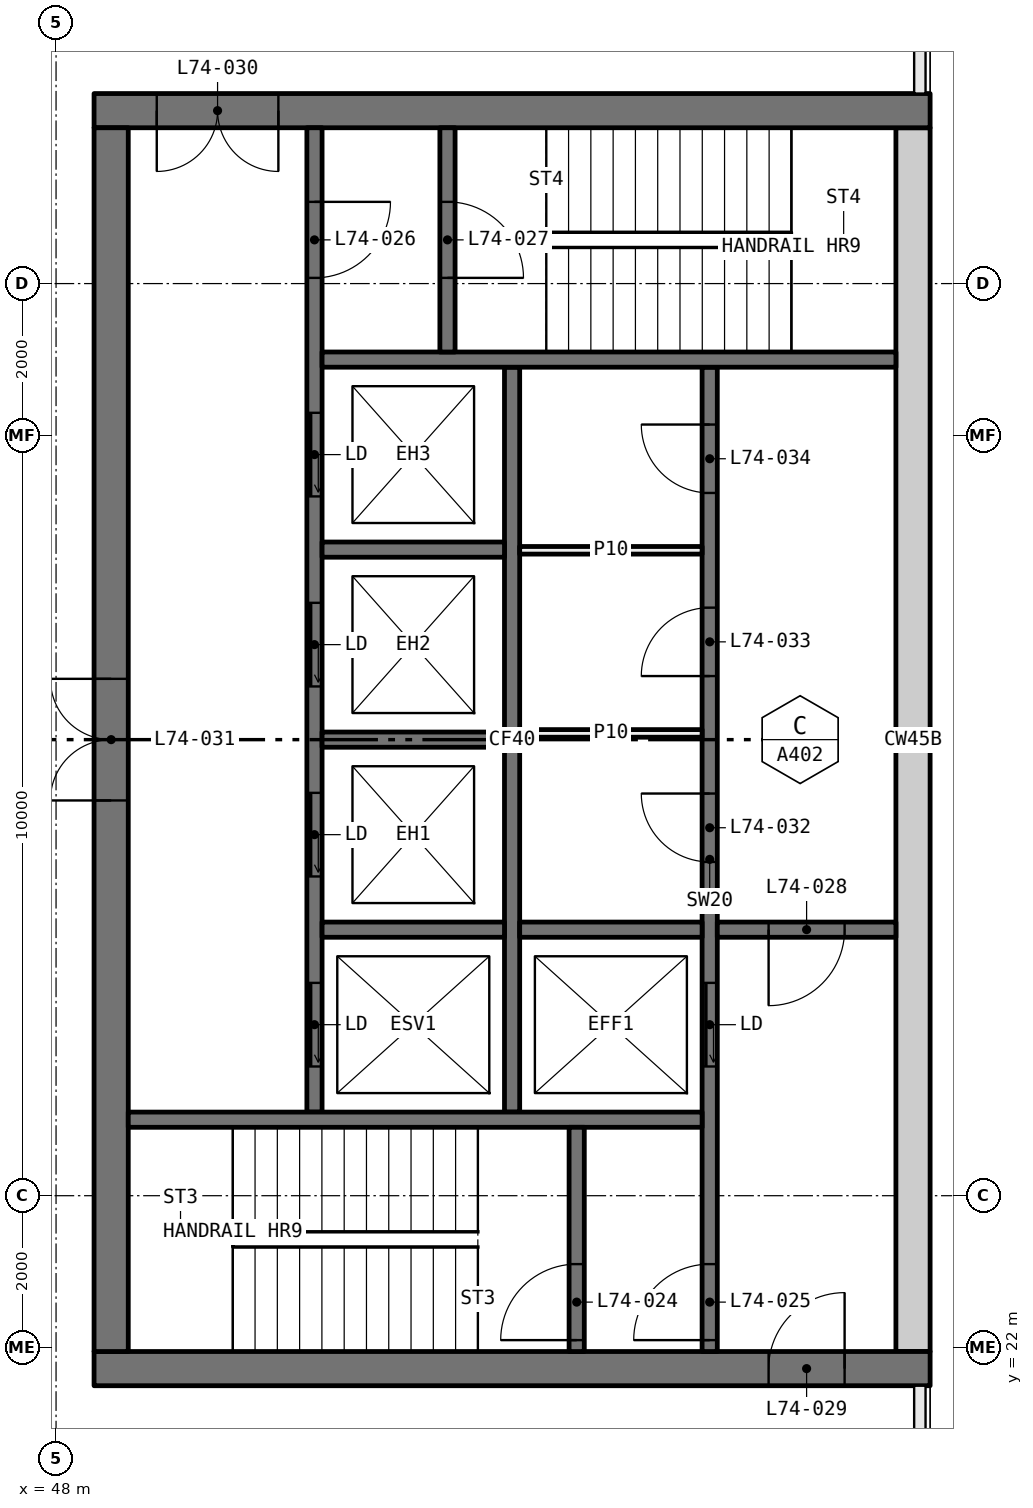
"""IFC4 building model, lengths in metres.
Left out: names, types, materials, properties, quantities, classifications, styles, units other than length and angle.
Written with IfcOpenShell. Run it as: python <this file> out.ifc"""

import sys

from ifc_helpers import new_model, si_unit, direction, frame, frame_2d, origin, place, context, subcontext, project, spatial, rectangle, extrude, element, fill, save


model = new_model("IFC4")
c1 = context("Model", 3, precision=1e-05, world=origin(), true_north=direction((0.0, 1.0)))
c2 = subcontext(c1, "Body", "Model", "MODEL_VIEW")
j1 = project(units=[si_unit("LENGTHUNIT", "METRE"), si_unit("PLANEANGLEUNIT", "RADIAN")], contexts=[c1])
p1 = place(None, origin())
s1 = spatial("IfcSite", under=j1, at=p1, CompositionType="ELEMENT")
p2 = place(p1, origin())
s2 = spatial("IfcBuilding", under=s1, at=p2, CompositionType="ELEMENT")
p3 = place(p2, frame((0.0, 0.0, 273.15)))
s3 = spatial("IfcBuildingStorey", under=s2, at=p3, CompositionType="ELEMENT", Elevation=273.15)
p4 = place(p3, frame((59.5, 21.725, 0.0), z_axis=(0.0, 0.0, 1.0), x_axis=(-1.0, 0.0, 0.0)))
e1 = element("IfcWall", 1, at=p4, inside=s3, PredefinedType="SHEAR", context=c2, shape_type="SweptSolid", body=[
    extrude(rectangle(XDim=11.0, YDim=0.45, at=frame_2d((5.5, 0.0))), origin(), (0.0, 0.0, 1.0), 4.4),
])
p5 = place(p4, frame((1.125, 0.0, 0.0)))
e2 = element("IfcOpeningElement", 2, at=p5, cuts=e1, PredefinedType="OPENING", context=c2, shape_type="SweptSolid", body=[
    extrude(rectangle(XDim=1.0, YDim=2.1, at=frame_2d((0.5, 1.05))), frame((0.0, 0.235, 0.0), z_axis=(0.0, -1.0, 0.0), x_axis=(1.0, 0.0, 0.0)), (0.0, 0.0, 1.0), 0.47),
])
p6 = place(p3, frame((59.5, 38.275, 0.0), z_axis=(0.0, 0.0, 1.0), x_axis=(-1.0, 0.0, 0.0)))
e3 = element("IfcWall", 3, at=p6, inside=s3, PredefinedType="SHEAR", context=c2, shape_type="SweptSolid", body=[
    extrude(rectangle(XDim=11.0, YDim=0.45, at=frame_2d((5.5, 0.0))), origin(), (0.0, 0.0, 1.0), 4.4),
])
p7 = place(p6, frame((8.575, 0.0, 0.0)))
e4 = element("IfcOpeningElement", 4, at=p7, cuts=e3, PredefinedType="OPENING", context=c2, shape_type="SweptSolid", body=[
    extrude(rectangle(XDim=1.6, YDim=2.1, at=frame_2d((0.8, 1.05))), frame((0.0, 0.235, 0.0), z_axis=(0.0, -1.0, 0.0), x_axis=(1.0, 0.0, 0.0)), (0.0, 0.0, 1.0), 0.47),
])
p8 = place(p3, frame((59.275, 21.95, 0.0), z_axis=(0.0, 0.0, 1.0), x_axis=(0.0, 1.0, 0.0)))
e5 = element("IfcWall", 5, at=p8, inside=s3, PredefinedType="SHEAR", context=c2, shape_type="SweptSolid", body=[
    extrude(rectangle(XDim=16.1, YDim=0.45, at=frame_2d((8.05, 0.0))), origin(), (0.0, 0.0, 1.0), 4.4),
])
p9 = place(p3, frame((48.725, 21.95, 0.0), z_axis=(0.0, 0.0, 1.0), x_axis=(0.0, 1.0, 0.0)))
e6 = element("IfcWall", 6, at=p9, inside=s3, PredefinedType="SHEAR", context=c2, shape_type="SweptSolid", body=[
    extrude(rectangle(XDim=16.1, YDim=0.45, at=frame_2d((8.05, 0.0))), origin(), (0.0, 0.0, 1.0), 4.4),
])
p10 = place(p9, frame((7.25, 0.0, 0.0)))
e7 = element("IfcOpeningElement", 7, at=p10, cuts=e6, PredefinedType="OPENING", context=c2, shape_type="SweptSolid", body=[
    extrude(rectangle(XDim=1.6, YDim=2.1, at=frame_2d((0.8, 1.05))), frame((0.0, 0.235, 0.0), z_axis=(0.0, -1.0, 0.0), x_axis=(1.0, 0.0, 0.0)), (0.0, 0.0, 1.0), 0.47),
])
p11 = place(p3, frame((56.6, 21.95, 0.0), z_axis=(0.0, 0.0, 1.0), x_axis=(0.0, 1.0, 0.0)))
e8 = element("IfcWall", 8, at=p11, inside=s3, PredefinedType="SOLIDWALL", context=c2, shape_type="SweptSolid", body=[
    extrude(rectangle(XDim=12.95, YDim=0.2, at=frame_2d((6.475, 0.0))), origin(), (0.0, 0.0, 1.0), 4.4),
])
p12 = place(p11, frame((3.75, 0.0, 0.0)))
e9 = element("IfcOpeningElement", 9, at=p12, cuts=e8, PredefinedType="OPENING", context=c2, shape_type="SweptSolid", body=[
    extrude(rectangle(XDim=1.1, YDim=2.1, at=frame_2d((0.55, 1.05))), frame((0.0, 0.11, 0.0), z_axis=(0.0, -1.0, 0.0), x_axis=(1.0, 0.0, 0.0)), (0.0, 0.0, 1.0), 0.22),
])
p13 = place(p11, frame((0.15, 0.0, 0.0)))
e10 = element("IfcOpeningElement", 10, at=p13, cuts=e8, PredefinedType="OPENING", context=c2, shape_type="SweptSolid", body=[
    extrude(rectangle(XDim=1.0, YDim=2.1, at=frame_2d((0.5, 1.05))), frame((0.0, 0.11, 0.0), z_axis=(0.0, -1.0, 0.0), x_axis=(1.0, 0.0, 0.0)), (0.0, 0.0, 1.0), 0.22),
])
p14 = place(p11, frame((6.441, 0.0, 0.0)))
e11 = element("IfcOpeningElement", 11, at=p14, cuts=e8, PredefinedType="OPENING", context=c2, shape_type="SweptSolid", body=[
    extrude(rectangle(XDim=0.9, YDim=2.1, at=frame_2d((0.45, 1.05))), frame((0.0, 0.11, 0.0), z_axis=(0.0, -1.0, 0.0), x_axis=(1.0, 0.0, 0.0)), (0.0, 0.0, 1.0), 0.22),
])
p15 = place(p11, frame((8.886, 0.0, 0.0)))
e12 = element("IfcOpeningElement", 12, at=p15, cuts=e8, PredefinedType="OPENING", context=c2, shape_type="SweptSolid", body=[
    extrude(rectangle(XDim=0.9, YDim=2.1, at=frame_2d((0.45, 1.05))), frame((0.0, 0.11, 0.0), z_axis=(0.0, -1.0, 0.0), x_axis=(1.0, 0.0, 0.0)), (0.0, 0.0, 1.0), 0.22),
])
p16 = place(p11, frame((11.295, 0.0, 0.0)))
e13 = element("IfcOpeningElement", 13, at=p16, cuts=e8, PredefinedType="OPENING", context=c2, shape_type="SweptSolid", body=[
    extrude(rectangle(XDim=0.9, YDim=2.1, at=frame_2d((0.45, 1.05))), frame((0.0, 0.11, 0.0), z_axis=(0.0, -1.0, 0.0), x_axis=(1.0, 0.0, 0.0)), (0.0, 0.0, 1.0), 0.22),
])
p17 = place(p3, frame((51.4, 25.1, 0.0), z_axis=(0.0, 0.0, 1.0), x_axis=(0.0, 1.0, 0.0)))
e14 = element("IfcWall", 14, at=p17, inside=s3, PredefinedType="SOLIDWALL", context=c2, shape_type="SweptSolid", body=[
    extrude(rectangle(XDim=12.95, YDim=0.2, at=frame_2d((6.475, 0.0))), origin(), (0.0, 0.0, 1.0), 4.4),
])
p18 = place(p17, frame((0.6, 0.0, 0.0)))
e15 = element("IfcOpeningElement", 15, at=p18, cuts=e14, PredefinedType="OPENING", context=c2, shape_type="SweptSolid", body=[
    extrude(rectangle(XDim=1.1, YDim=2.1, at=frame_2d((0.55, 1.05))), frame((0.0, 0.11, 0.0), z_axis=(0.0, -1.0, 0.0), x_axis=(1.0, 0.0, 0.0)), (0.0, 0.0, 1.0), 0.22),
])
p19 = place(p17, frame((3.1, 0.0, 0.0)))
e16 = element("IfcOpeningElement", 16, at=p19, cuts=e14, PredefinedType="OPENING", context=c2, shape_type="SweptSolid", body=[
    extrude(rectangle(XDim=1.1, YDim=2.1, at=frame_2d((0.55, 1.05))), frame((0.0, 0.11, 0.0), z_axis=(0.0, -1.0, 0.0), x_axis=(1.0, 0.0, 0.0)), (0.0, 0.0, 1.0), 0.22),
])
p20 = place(p17, frame((5.6, 0.0, 0.0)))
e17 = element("IfcOpeningElement", 17, at=p20, cuts=e14, PredefinedType="OPENING", context=c2, shape_type="SweptSolid", body=[
    extrude(rectangle(XDim=1.1, YDim=2.1, at=frame_2d((0.55, 1.05))), frame((0.0, 0.11, 0.0), z_axis=(0.0, -1.0, 0.0), x_axis=(1.0, 0.0, 0.0)), (0.0, 0.0, 1.0), 0.22),
])
p21 = place(p17, frame((8.1, 0.0, 0.0)))
e18 = element("IfcOpeningElement", 18, at=p21, cuts=e14, PredefinedType="OPENING", context=c2, shape_type="SweptSolid", body=[
    extrude(rectangle(XDim=1.1, YDim=2.1, at=frame_2d((0.55, 1.05))), frame((0.0, 0.11, 0.0), z_axis=(0.0, -1.0, 0.0), x_axis=(1.0, 0.0, 0.0)), (0.0, 0.0, 1.0), 0.22),
])
p22 = place(p17, frame((10.975, 0.0, 0.0)))
e19 = element("IfcOpeningElement", 19, at=p22, cuts=e14, PredefinedType="OPENING", context=c2, shape_type="SweptSolid", body=[
    extrude(rectangle(XDim=1.0, YDim=2.1, at=frame_2d((0.5, 1.05))), frame((0.0, 0.11, 0.0), z_axis=(0.0, -1.0, 0.0), x_axis=(1.0, 0.0, 0.0)), (0.0, 0.0, 1.0), 0.22),
])
p23 = place(p3, frame((54.0, 25.1, 0.0), z_axis=(0.0, 0.0, 1.0), x_axis=(0.0, 1.0, 0.0)))
e20 = element("IfcWall", 20, at=p23, inside=s3, PredefinedType="SOLIDWALL", context=c2, shape_type="SweptSolid", body=[
    extrude(rectangle(XDim=9.8, YDim=0.2, at=frame_2d((4.9, 0.0))), origin(), (0.0, 0.0, 1.0), 4.4),
])
for number, where, z_axis, x_axis in (
    (21, (56.5, 25.0, 0.0), (0.0, 0.0, 1.0), (-1.0, 0.0, 0.0)),
    (22, (59.05, 35.0, 0.0), (0.0, 0.0, 1.0), (-1.0, 0.0, 0.0)),
):
    element("IfcWall", number, at=place(p3, frame(where, z_axis=z_axis, x_axis=x_axis)), inside=s3, PredefinedType="SOLIDWALL", context=c2, shape_type="SweptSolid", body=[
        extrude(rectangle(XDim=7.55, YDim=0.2, at=frame_2d((3.775, 0.0))), origin(), (0.0, 0.0, 1.0), 4.4),
    ])
p24 = place(p3, frame((59.05, 27.5, 0.0), z_axis=(0.0, 0.0, 1.0), x_axis=(-1.0, 0.0, 0.0)))
e23 = element("IfcWall", 23, at=p24, inside=s3, PredefinedType="SOLIDWALL", context=c2, shape_type="SweptSolid", body=[
    extrude(rectangle(XDim=2.35, YDim=0.2, at=frame_2d((1.175, 0.0))), origin(), (0.0, 0.0, 1.0), 4.4),
])
p25 = place(p24, frame((0.675, 0.0, 0.0)))
e24 = element("IfcOpeningElement", 24, at=p25, cuts=e23, PredefinedType="OPENING", context=c2, shape_type="SweptSolid", body=[
    extrude(rectangle(XDim=1.0, YDim=2.1, at=frame_2d((0.5, 1.05))), frame((0.0, 0.11, 0.0), z_axis=(0.0, -1.0, 0.0), x_axis=(1.0, 0.0, 0.0)), (0.0, 0.0, 1.0), 0.22),
])
p26 = place(p3, frame((54.85, 21.95, 0.0), z_axis=(0.0, 0.0, 1.0), x_axis=(0.0, 1.0, 0.0)))
e25 = element("IfcWall", 25, at=p26, inside=s3, PredefinedType="SOLIDWALL", context=c2, shape_type="SweptSolid", body=[
    extrude(rectangle(XDim=2.95, YDim=0.2, at=frame_2d((1.475, 0.0))), origin(), (0.0, 0.0, 1.0), 4.4),
])
p27 = place(p26, frame((0.15, 0.0, 0.0)))
e26 = element("IfcOpeningElement", 26, at=p27, cuts=e25, PredefinedType="OPENING", context=c2, shape_type="SweptSolid", body=[
    extrude(rectangle(XDim=1.0, YDim=2.1, at=frame_2d((0.5, 1.05))), frame((0.0, 0.11, 0.0), z_axis=(0.0, -1.0, 0.0), x_axis=(1.0, 0.0, 0.0)), (0.0, 0.0, 1.0), 0.22),
])
p28 = place(p3, frame((53.15, 35.1, 0.0), z_axis=(0.0, 0.0, 1.0), x_axis=(0.0, 1.0, 0.0)))
e27 = element("IfcWall", 27, at=p28, inside=s3, PredefinedType="SOLIDWALL", context=c2, shape_type="SweptSolid", body=[
    extrude(rectangle(XDim=2.95, YDim=0.2, at=frame_2d((1.475, 0.0))), origin(), (0.0, 0.0, 1.0), 4.4),
])
p29 = place(p28, frame((0.975, 0.0, 0.0)))
e28 = element("IfcOpeningElement", 28, at=p29, cuts=e27, PredefinedType="OPENING", context=c2, shape_type="SweptSolid", body=[
    extrude(rectangle(XDim=1.0, YDim=2.1, at=frame_2d((0.5, 1.05))), frame((0.0, 0.11, 0.0), z_axis=(0.0, -1.0, 0.0), x_axis=(1.0, 0.0, 0.0)), (0.0, 0.0, 1.0), 0.22),
])
for number, where, z_axis, x_axis in (
    (29, (56.5, 27.5, 0.0), (0.0, 0.0, 1.0), (-1.0, 0.0, 0.0)),
    (30, (53.9, 27.5, 0.0), (0.0, 0.0, 1.0), (-1.0, 0.0, 0.0)),
    (31, (53.9, 30.0, 0.0), (0.0, 0.0, 1.0), (-1.0, 0.0, 0.0)),
    (32, (53.9, 32.5, 0.0), (0.0, 0.0, 1.0), (-1.0, 0.0, 0.0)),
):
    element("IfcWall", number, at=place(p3, frame(where, z_axis=z_axis, x_axis=x_axis)), inside=s3, PredefinedType="SOLIDWALL", context=c2, shape_type="SweptSolid", body=[
        extrude(rectangle(XDim=2.4, YDim=0.2, at=frame_2d((1.2, 0.0))), origin(), (0.0, 0.0, 1.0), 4.4),
    ])
for number, where, z_axis, x_axis in (
    (33, (56.5, 30.082, 0.0), (0.0, 0.0, 1.0), (-1.0, 0.0, 0.0)),
    (34, (56.5, 32.491, 0.0), (0.0, 0.0, 1.0), (-1.0, 0.0, 0.0)),
):
    element("IfcWall", number, at=place(p3, frame(where, z_axis=z_axis, x_axis=x_axis)), inside=s3, PredefinedType="PARTITIONING", context=c2, shape_type="SweptSolid", body=[
        extrude(rectangle(XDim=2.4, YDim=0.1, at=frame_2d((1.2, 0.0))), origin(), (0.0, 0.0, 1.0), 4.4),
    ])
p30 = place(p18, origin())
e35 = element("IfcDoor", 35, at=p30, inside=s3, OperationType="SLIDING_TO_LEFT", PredefinedType="DOOR", context=c2, shape_type="SweptSolid", body=[
    extrude(rectangle(XDim=1.1, YDim=2.1, at=frame_2d((0.55, 1.05))), frame((0.0, 0.025, 0.0), z_axis=(0.0, -1.0, 0.0), x_axis=(1.0, 0.0, 0.0)), (0.0, 0.0, 1.0), 0.05),
])
fill(e15, e35)
p31 = place(p19, origin())
e36 = element("IfcDoor", 36, at=p31, inside=s3, OperationType="SLIDING_TO_LEFT", PredefinedType="DOOR", context=c2, shape_type="SweptSolid", body=[
    extrude(rectangle(XDim=1.1, YDim=2.1, at=frame_2d((0.55, 1.05))), frame((0.0, 0.025, 0.0), z_axis=(0.0, -1.0, 0.0), x_axis=(1.0, 0.0, 0.0)), (0.0, 0.0, 1.0), 0.05),
])
fill(e16, e36)
p32 = place(p20, origin())
e37 = element("IfcDoor", 37, at=p32, inside=s3, OperationType="SLIDING_TO_LEFT", PredefinedType="DOOR", context=c2, shape_type="SweptSolid", body=[
    extrude(rectangle(XDim=1.1, YDim=2.1, at=frame_2d((0.55, 1.05))), frame((0.0, 0.025, 0.0), z_axis=(0.0, -1.0, 0.0), x_axis=(1.0, 0.0, 0.0)), (0.0, 0.0, 1.0), 0.05),
])
fill(e17, e37)
p33 = place(p21, origin())
e38 = element("IfcDoor", 38, at=p33, inside=s3, OperationType="SLIDING_TO_LEFT", PredefinedType="DOOR", context=c2, shape_type="SweptSolid", body=[
    extrude(rectangle(XDim=1.1, YDim=2.1, at=frame_2d((0.55, 1.05))), frame((0.0, 0.025, 0.0), z_axis=(0.0, -1.0, 0.0), x_axis=(1.0, 0.0, 0.0)), (0.0, 0.0, 1.0), 0.05),
])
fill(e18, e38)
p34 = place(p12, origin())
e39 = element("IfcDoor", 39, at=p34, inside=s3, OperationType="SLIDING_TO_LEFT", PredefinedType="DOOR", context=c2, shape_type="SweptSolid", body=[
    extrude(rectangle(XDim=1.1, YDim=2.1, at=frame_2d((0.55, 1.05))), frame((0.0, 0.025, 0.0), z_axis=(0.0, -1.0, 0.0), x_axis=(1.0, 0.0, 0.0)), (0.0, 0.0, 1.0), 0.05),
])
fill(e9, e39)
p35 = place(p27, origin())
e40 = element("IfcDoor", 40, at=p35, inside=s3, OperationType="SINGLE_SWING_RIGHT", PredefinedType="DOOR", context=c2, shape_type="SweptSolid", body=[
    extrude(rectangle(XDim=1.0, YDim=2.1, at=frame_2d((0.5, 1.05))), frame((0.0, 0.025, 0.0), z_axis=(0.0, -1.0, 0.0), x_axis=(1.0, 0.0, 0.0)), (0.0, 0.0, 1.0), 0.05),
])
fill(e26, e40)
p36 = place(p13, origin())
e41 = element("IfcDoor", 41, at=p36, inside=s3, OperationType="SINGLE_SWING_RIGHT", PredefinedType="DOOR", context=c2, shape_type="SweptSolid", body=[
    extrude(rectangle(XDim=1.0, YDim=2.1, at=frame_2d((0.5, 1.05))), frame((0.0, 0.025, 0.0), z_axis=(0.0, -1.0, 0.0), x_axis=(1.0, 0.0, 0.0)), (0.0, 0.0, 1.0), 0.05),
])
fill(e10, e41)
p37 = place(p22, frame((1.0, 0.0, 0.0), x_axis=(-1.0, 0.0, 0.0)))
e42 = element("IfcDoor", 42, at=p37, inside=s3, OperationType="SINGLE_SWING_RIGHT", PredefinedType="DOOR", context=c2, shape_type="SweptSolid", body=[
    extrude(rectangle(XDim=1.0, YDim=2.1, at=frame_2d((0.5, 1.05))), frame((0.0, 0.025, 0.0), z_axis=(0.0, -1.0, 0.0), x_axis=(1.0, 0.0, 0.0)), (0.0, 0.0, 1.0), 0.05),
])
fill(e19, e42)
p38 = place(p29, frame((1.0, 0.0, 0.0), x_axis=(-1.0, 0.0, 0.0)))
e43 = element("IfcDoor", 43, at=p38, inside=s3, OperationType="SINGLE_SWING_LEFT", PredefinedType="DOOR", context=c2, shape_type="SweptSolid", body=[
    extrude(rectangle(XDim=1.0, YDim=2.1, at=frame_2d((0.5, 1.05))), frame((0.0, 0.025, 0.0), z_axis=(0.0, -1.0, 0.0), x_axis=(1.0, 0.0, 0.0)), (0.0, 0.0, 1.0), 0.05),
])
fill(e28, e43)
p39 = place(p25, origin())
e44 = element("IfcDoor", 44, at=p39, inside=s3, OperationType="SINGLE_SWING_LEFT", PredefinedType="DOOR", context=c2, shape_type="SweptSolid", body=[
    extrude(rectangle(XDim=1.0, YDim=2.1, at=frame_2d((0.5, 1.05))), frame((0.0, 0.025, 0.0), z_axis=(0.0, -1.0, 0.0), x_axis=(1.0, 0.0, 0.0)), (0.0, 0.0, 1.0), 0.05),
])
fill(e24, e44)
p40 = place(p5, frame((1.0, 0.0, 0.0), x_axis=(-1.0, 0.0, 0.0)))
e45 = element("IfcDoor", 45, at=p40, inside=s3, OperationType="SINGLE_SWING_LEFT", PredefinedType="DOOR", context=c2, shape_type="SweptSolid", body=[
    extrude(rectangle(XDim=1.0, YDim=2.1, at=frame_2d((0.5, 1.05))), frame((0.0, 0.025, 0.0), z_axis=(0.0, -1.0, 0.0), x_axis=(1.0, 0.0, 0.0)), (0.0, 0.0, 1.0), 0.05),
])
fill(e2, e45)
p41 = place(p7, origin())
e46 = element("IfcDoor", 46, at=p41, inside=s3, OperationType="DOUBLE_DOOR_SINGLE_SWING", PredefinedType="DOOR", context=c2, shape_type="SweptSolid", body=[
    extrude(rectangle(XDim=1.6, YDim=2.1, at=frame_2d((0.8, 1.05))), frame((0.0, 0.025, 0.0), z_axis=(0.0, -1.0, 0.0), x_axis=(1.0, 0.0, 0.0)), (0.0, 0.0, 1.0), 0.05),
])
fill(e4, e46)
p42 = place(p10, origin())
e47 = element("IfcDoor", 47, at=p42, inside=s3, OperationType="DOUBLE_DOOR_SINGLE_SWING", PredefinedType="DOOR", context=c2, shape_type="SweptSolid", body=[
    extrude(rectangle(XDim=1.6, YDim=2.1, at=frame_2d((0.8, 1.05))), frame((0.0, 0.025, 0.0), z_axis=(0.0, -1.0, 0.0), x_axis=(1.0, 0.0, 0.0)), (0.0, 0.0, 1.0), 0.05),
])
fill(e7, e47)
p43 = place(p14, origin())
e48 = element("IfcDoor", 48, at=p43, inside=s3, OperationType="SINGLE_SWING_LEFT", PredefinedType="DOOR", context=c2, shape_type="SweptSolid", body=[
    extrude(rectangle(XDim=0.9, YDim=2.1, at=frame_2d((0.45, 1.05))), frame((0.0, 0.025, 0.0), z_axis=(0.0, -1.0, 0.0), x_axis=(1.0, 0.0, 0.0)), (0.0, 0.0, 1.0), 0.05),
])
fill(e11, e48)
p44 = place(p15, origin())
e49 = element("IfcDoor", 49, at=p44, inside=s3, OperationType="SINGLE_SWING_RIGHT", PredefinedType="DOOR", context=c2, shape_type="SweptSolid", body=[
    extrude(rectangle(XDim=0.9, YDim=2.1, at=frame_2d((0.45, 1.05))), frame((0.0, 0.025, 0.0), z_axis=(0.0, -1.0, 0.0), x_axis=(1.0, 0.0, 0.0)), (0.0, 0.0, 1.0), 0.05),
])
fill(e12, e49)
p45 = place(p16, origin())
e50 = element("IfcDoor", 50, at=p45, inside=s3, OperationType="SINGLE_SWING_LEFT", PredefinedType="DOOR", context=c2, shape_type="SweptSolid", body=[
    extrude(rectangle(XDim=0.9, YDim=2.1, at=frame_2d((0.45, 1.05))), frame((0.0, 0.025, 0.0), z_axis=(0.0, -1.0, 0.0), x_axis=(1.0, 0.0, 0.0)), (0.0, 0.0, 1.0), 0.05),
])
fill(e13, e50)
save(model, sys.argv[1])
